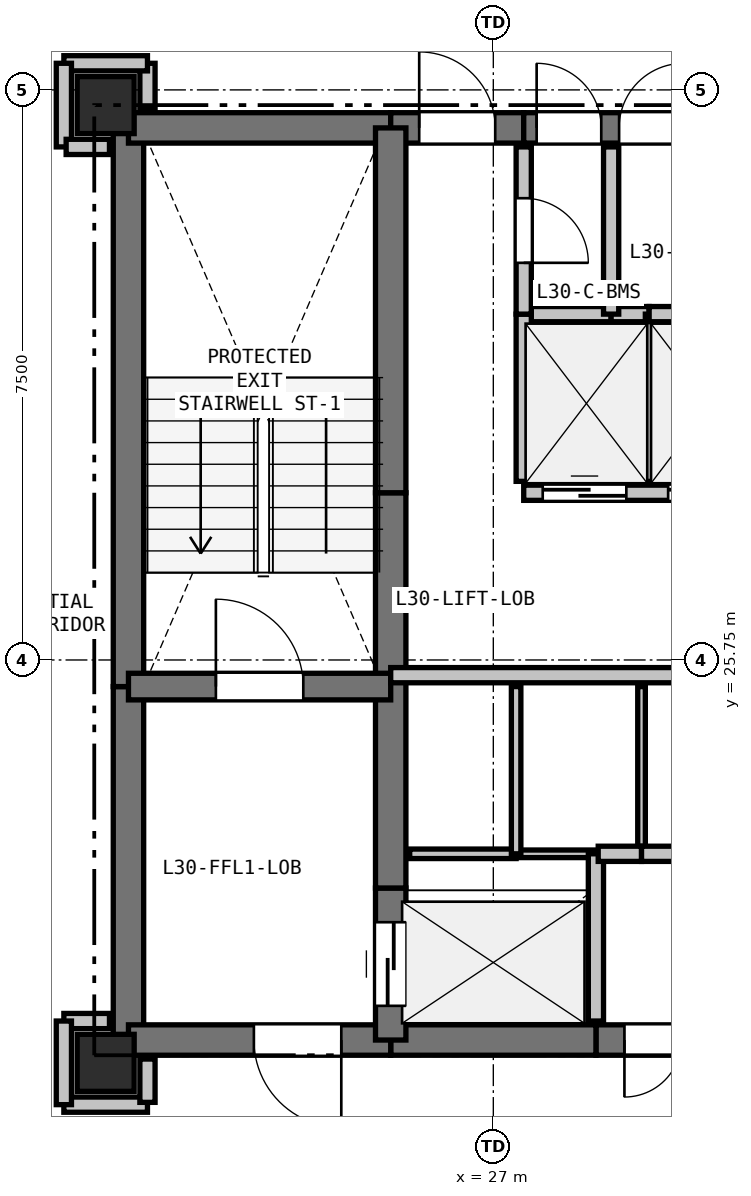
"""IFC4 building model, lengths in metres.
Left out: names, types, materials, properties, quantities, classifications, styles, units other than length and angle.
Written with IfcOpenShell. Run it as: python <this file> out.ifc"""

import sys

from ifc_helpers import new_model, si_unit, direction, frame, frame_2d, origin, origin_2d, place, context, subcontext, project, spatial, rectangle, extrude, element, fill, save


model = new_model("IFC4")
c1 = context("Model", 3, precision=1e-05, world=origin(), true_north=direction((0.0, 1.0)))
c2 = subcontext(c1, "Body", "Model", "MODEL_VIEW")
j1 = project(units=[si_unit("LENGTHUNIT", "METRE"), si_unit("PLANEANGLEUNIT", "RADIAN")], contexts=[c1])
p1 = place(None, origin())
s1 = spatial("IfcSite", under=j1, at=p1, CompositionType="ELEMENT")
p2 = place(p1, origin())
s2 = spatial("IfcBuilding", under=s1, at=p2, CompositionType="ELEMENT")
p3 = place(p2, frame((0.0, 0.0, 109.8)))
s3 = spatial("IfcBuildingStorey", under=s2, at=p3, CompositionType="ELEMENT", Elevation=109.8)
for number, where, z_axis, x_axis in (
    (1, (21.9, 20.45, 0.0), (0.0, 0.0, 1.0), (1.0, 0.0, 0.0)),
    (2, (21.9, 33.05, 0.0), (0.0, 0.0, 1.0), (1.0, 0.0, 0.0)),
):
    element("IfcColumn", number, at=place(p3, frame(where, z_axis=z_axis, x_axis=x_axis)), inside=s3, PredefinedType="COLUMN", context=c2, shape_type="SweptSolid", body=[
        extrude(rectangle(XDim=0.75, YDim=0.75, at=origin_2d()), origin(), (0.0, 0.0, 1.0), 3.3),
    ])
p4 = place(p3, frame((22.2, 20.75, 0.0), z_axis=(0.0, 0.0, 1.0), x_axis=(0.0, 1.0, 0.0)))
e3 = element("IfcWall", 3, at=p4, inside=s3, PredefinedType="SHEAR", context=c2, shape_type="SweptSolid", body=[
    extrude(rectangle(XDim=4.65, YDim=0.4, at=frame_2d((2.325, 0.0))), origin(), (0.0, 0.0, 1.0), 3.05),
])
p5 = place(p3, frame((22.2, 25.4, 0.0), z_axis=(0.0, 0.0, 1.0), x_axis=(0.0, 1.0, 0.0)))
e4 = element("IfcWall", 4, at=p5, inside=s3, PredefinedType="SHEAR", context=c2, shape_type="SweptSolid", body=[
    extrude(rectangle(XDim=7.35, YDim=0.4, at=frame_2d((3.675, 0.0))), origin(), (0.0, 0.0, 1.0), 3.05),
])
p6 = place(p3, frame((22.2, 32.75, 0.0), z_axis=(0.0, 0.0, 1.0), x_axis=(1.0, 0.0, 0.0)))
e5 = element("IfcWall", 5, at=p6, inside=s3, PredefinedType="SHEAR", context=c2, shape_type="SweptSolid", body=[
    extrude(rectangle(XDim=3.45, YDim=0.4, at=frame_2d((1.725, 0.0))), origin(), (0.0, 0.0, 1.0), 3.05),
])
p7 = place(p3, frame((25.65, 32.75, 0.0), z_axis=(0.0, 0.0, 1.0), x_axis=(1.0, 0.0, 0.0)))
e6 = element("IfcWall", 6, at=p7, inside=s3, PredefinedType="SHEAR", context=c2, shape_type="SweptSolid", body=[
    extrude(rectangle(XDim=1.75, YDim=0.4, at=frame_2d((0.875, 0.0))), origin(), (0.0, 0.0, 1.0), 3.05),
])
p8 = place(p7, frame((0.375, 0.0, 0.0)))
e7 = element("IfcOpeningElement", 7, at=p8, cuts=e6, PredefinedType="OPENING", context=c2, shape_type="SweptSolid", body=[
    extrude(rectangle(XDim=1.0, YDim=2.15, at=frame_2d((0.5, 1.075))), frame((0.0, 0.21, 0.0), z_axis=(0.0, -1.0, 0.0), x_axis=(1.0, 0.0, 0.0)), (0.0, 0.0, 1.0), 0.42),
])
p9 = place(p3, frame((27.4, 32.75, 0.0), z_axis=(0.0, 0.0, 1.0), x_axis=(1.0, 0.0, 0.0)))
e8 = element("IfcWall", 8, at=p9, inside=s3, PredefinedType="SHEAR", context=c2, shape_type="SweptSolid", body=[
    extrude(rectangle(XDim=2.25, YDim=0.4, at=frame_2d((1.125, 0.0))), origin(), (0.0, 0.0, 1.0), 3.05),
])
p10 = place(p9, frame((0.17, 0.0, 0.0)))
e9 = element("IfcOpeningElement", 9, at=p10, cuts=e8, PredefinedType="OPENING", context=c2, shape_type="SweptSolid", body=[
    extrude(rectangle(XDim=0.85, YDim=2.1, at=frame_2d((0.425, 1.05))), frame((0.0, 0.21, 0.0), z_axis=(0.0, -1.0, 0.0), x_axis=(1.0, 0.0, 0.0)), (0.0, 0.0, 1.0), 0.42),
])
p11 = place(p9, frame((1.255, 0.0, 0.0)))
e10 = element("IfcOpeningElement", 10, at=p11, cuts=e8, PredefinedType="OPENING", context=c2, shape_type="SweptSolid", body=[
    extrude(rectangle(XDim=0.85, YDim=2.1, at=frame_2d((0.425, 1.05))), frame((0.0, 0.21, 0.0), z_axis=(0.0, -1.0, 0.0), x_axis=(1.0, 0.0, 0.0)), (0.0, 0.0, 1.0), 0.42),
])
p12 = place(p3, frame((30.6, 20.75, 0.0), z_axis=(0.0, 0.0, 1.0), x_axis=(-1.0, 0.0, 0.0)))
e11 = element("IfcWall", 11, at=p12, inside=s3, PredefinedType="SHEAR", context=c2, shape_type="SweptSolid", body=[
    extrude(rectangle(XDim=2.25, YDim=0.4, at=frame_2d((1.125, 0.0))), origin(), (0.0, 0.0, 1.0), 3.05),
])
p13 = place(p12, frame((0.375, 0.0, 0.0)))
e12 = element("IfcOpeningElement", 12, at=p13, cuts=e11, PredefinedType="OPENING", context=c2, shape_type="SweptSolid", body=[
    extrude(rectangle(XDim=1.5, YDim=2.2, at=frame_2d((0.75, 1.1))), frame((0.0, 0.21, 0.0), z_axis=(0.0, -1.0, 0.0), x_axis=(1.0, 0.0, 0.0)), (0.0, 0.0, 1.0), 0.42),
])
p14 = place(p3, frame((28.35, 20.75, 0.0), z_axis=(0.0, 0.0, 1.0), x_axis=(-1.0, 0.0, 0.0)))
e13 = element("IfcWall", 13, at=p14, inside=s3, PredefinedType="SHEAR", context=c2, shape_type="SweptSolid", body=[
    extrude(rectangle(XDim=2.7, YDim=0.4, at=frame_2d((1.35, 0.0))), origin(), (0.0, 0.0, 1.0), 3.05),
])
p15 = place(p3, frame((25.65, 20.75, 0.0), z_axis=(0.0, 0.0, 1.0), x_axis=(-1.0, 0.0, 0.0)))
e14 = element("IfcWall", 14, at=p15, inside=s3, PredefinedType="SHEAR", context=c2, shape_type="SweptSolid", body=[
    extrude(rectangle(XDim=3.45, YDim=0.4, at=frame_2d((1.725, 0.0))), origin(), (0.0, 0.0, 1.0), 3.05),
])
p16 = place(p15, frame((0.65, 0.0, 0.0)))
e15 = element("IfcOpeningElement", 15, at=p16, cuts=e14, PredefinedType="OPENING", context=c2, shape_type="SweptSolid", body=[
    extrude(rectangle(XDim=1.15, YDim=2.15, at=frame_2d((0.575, 1.075))), frame((0.0, 0.21, 0.0), z_axis=(0.0, -1.0, 0.0), x_axis=(1.0, 0.0, 0.0)), (0.0, 0.0, 1.0), 0.42),
])
p17 = place(p3, frame((25.65, 20.75, 0.0), z_axis=(0.0, 0.0, 1.0), x_axis=(0.0, 1.0, 0.0)))
e16 = element("IfcWall", 16, at=p17, inside=s3, PredefinedType="SHEAR", context=c2, shape_type="SweptSolid", body=[
    extrude(rectangle(XDim=2.0, YDim=0.4, at=frame_2d((1.0, 0.0))), origin(), (0.0, 0.0, 1.0), 3.05),
])
p18 = place(p17, frame((0.45, 0.0, 0.0)))
e17 = element("IfcOpeningElement", 17, at=p18, cuts=e16, PredefinedType="OPENING", context=c2, shape_type="SweptSolid", body=[
    extrude(rectangle(XDim=1.1, YDim=2.15, at=frame_2d((0.55, 1.075))), frame((0.0, 0.21, 0.0), z_axis=(0.0, -1.0, 0.0), x_axis=(1.0, 0.0, 0.0)), (0.0, 0.0, 1.0), 0.42),
])
p19 = place(p3, frame((25.65, 22.75, 0.0), z_axis=(0.0, 0.0, 1.0), x_axis=(0.0, 1.0, 0.0)))
e18 = element("IfcWall", 18, at=p19, inside=s3, PredefinedType="SHEAR", context=c2, shape_type="SweptSolid", body=[
    extrude(rectangle(XDim=2.8, YDim=0.4, at=frame_2d((1.4, 0.0))), origin(), (0.0, 0.0, 1.0), 3.05),
])
p20 = place(p3, frame((25.65, 25.55, 0.0), z_axis=(0.0, 0.0, 1.0), x_axis=(0.0, 1.0, 0.0)))
e19 = element("IfcWall", 19, at=p20, inside=s3, PredefinedType="SHEAR", context=c2, shape_type="SweptSolid", body=[
    extrude(rectangle(XDim=2.4, YDim=0.4, at=frame_2d((1.2, 0.0))), origin(), (0.0, 0.0, 1.0), 3.05),
])
p21 = place(p3, frame((25.65, 27.95, 0.0), z_axis=(0.0, 0.0, 1.0), x_axis=(0.0, 1.0, 0.0)))
e20 = element("IfcWall", 20, at=p21, inside=s3, PredefinedType="SHEAR", context=c2, shape_type="SweptSolid", body=[
    extrude(rectangle(XDim=4.8, YDim=0.4, at=frame_2d((2.4, 0.0))), origin(), (0.0, 0.0, 1.0), 3.05),
])
p22 = place(p3, frame((22.2, 25.4, 0.0), z_axis=(0.0, 0.0, 1.0), x_axis=(1.0, 0.0, 0.0)))
e21 = element("IfcWall", 21, at=p22, inside=s3, PredefinedType="SHEAR", context=c2, shape_type="SweptSolid", body=[
    extrude(rectangle(XDim=3.45, YDim=0.35, at=frame_2d((1.725, 0.0))), origin(), (0.0, 0.0, 1.0), 3.05),
])
p23 = place(p22, frame((1.15, 0.0, 0.0)))
e22 = element("IfcOpeningElement", 22, at=p23, cuts=e21, PredefinedType="OPENING", context=c2, shape_type="SweptSolid", body=[
    extrude(rectangle(XDim=1.15, YDim=2.15, at=frame_2d((0.575, 1.075))), frame((0.0, 0.185, 0.0), z_axis=(0.0, -1.0, 0.0), x_axis=(1.0, 0.0, 0.0)), (0.0, 0.0, 1.0), 0.37),
])
p24 = place(p3, frame((25.65, 25.55, 0.0), z_axis=(0.0, 0.0, 1.0), x_axis=(1.0, 0.0, 0.0)))
e23 = element("IfcWall", 23, at=p24, inside=s3, PredefinedType="PARTITIONING", context=c2, shape_type="SweptSolid", body=[
    extrude(rectangle(XDim=4.95, YDim=0.2, at=frame_2d((2.475, 0.0))), origin(), (0.0, 0.0, 1.0), 3.05),
])
p25 = place(p3, frame((27.4, 27.95, 0.0), z_axis=(0.0, 0.0, 1.0), x_axis=(1.0, 0.0, 0.0)))
e24 = element("IfcWall", 24, at=p25, inside=s3, PredefinedType="PARTITIONING", context=c2, shape_type="SweptSolid", body=[
    extrude(rectangle(XDim=4.95, YDim=0.2, at=frame_2d((2.475, 0.0))), origin(), (0.0, 0.0, 1.0), 3.05),
])
p26 = place(p25, frame((0.25, 0.0, 0.0)))
e25 = element("IfcOpeningElement", 25, at=p26, cuts=e24, PredefinedType="OPENING", context=c2, shape_type="SweptSolid", body=[
    extrude(rectangle(XDim=1.1, YDim=2.15, at=frame_2d((0.55, 1.075))), frame((0.0, 0.11, 0.0), z_axis=(0.0, -1.0, 0.0), x_axis=(1.0, 0.0, 0.0)), (0.0, 0.0, 1.0), 0.22),
])
p27 = place(p25, frame((1.9, 0.0, 0.0)))
e26 = element("IfcOpeningElement", 26, at=p27, cuts=e24, PredefinedType="OPENING", context=c2, shape_type="SweptSolid", body=[
    extrude(rectangle(XDim=1.1, YDim=2.15, at=frame_2d((0.55, 1.075))), frame((0.0, 0.11, 0.0), z_axis=(0.0, -1.0, 0.0), x_axis=(1.0, 0.0, 0.0)), (0.0, 0.0, 1.0), 0.22),
])
p28 = place(p25, frame((3.55, 0.0, 0.0)))
e27 = element("IfcOpeningElement", 27, at=p28, cuts=e24, PredefinedType="OPENING", context=c2, shape_type="SweptSolid", body=[
    extrude(rectangle(XDim=1.1, YDim=2.15, at=frame_2d((0.55, 1.075))), frame((0.0, 0.11, 0.0), z_axis=(0.0, -1.0, 0.0), x_axis=(1.0, 0.0, 0.0)), (0.0, 0.0, 1.0), 0.22),
])
p29 = place(p3, frame((25.9, 23.2, 0.0), z_axis=(0.0, 0.0, 1.0), x_axis=(1.0, 0.0, 0.0)))
e28 = element("IfcWall", 28, at=p29, inside=s3, PredefinedType="PARTITIONING", context=c2, shape_type="SweptSolid", body=[
    extrude(rectangle(XDim=1.4, YDim=0.125, at=frame_2d((0.7, 0.0))), origin(), (0.0, 0.0, 1.0), 3.05),
])
p30 = place(p3, frame((27.3, 23.2, 0.0), z_axis=(0.0, 0.0, 1.0), x_axis=(1.0, 0.0, 0.0)))
e29 = element("IfcWall", 29, at=p30, inside=s3, PredefinedType="PARTITIONING", context=c2, shape_type="SweptSolid", body=[
    extrude(rectangle(XDim=1.05, YDim=0.1, at=frame_2d((0.525, 0.0))), origin(), (0.0, 0.0, 1.0), 3.05),
])
p31 = place(p3, frame((28.35, 23.2, 0.0), z_axis=(0.0, 0.0, 1.0), x_axis=(0.0, -1.0, 0.0)))
e30 = element("IfcWall", 30, at=p31, inside=s3, PredefinedType="PARTITIONING", context=c2, shape_type="SweptSolid", body=[
    extrude(rectangle(XDim=2.2, YDim=0.2, at=frame_2d((1.1, 0.0))), origin(), (0.0, 0.0, 1.0), 3.05),
])
p32 = place(p3, frame((27.3, 25.4, 0.0), z_axis=(0.0, 0.0, 1.0), x_axis=(0.0, -1.0, 0.0)))
e31 = element("IfcWall", 31, at=p32, inside=s3, PredefinedType="PARTITIONING", context=c2, shape_type="SweptSolid", body=[
    extrude(rectangle(XDim=2.2, YDim=0.125, at=frame_2d((1.1, 0.0))), origin(), (0.0, 0.0, 1.0), 3.05),
])
p33 = place(p3, frame((28.95, 25.4, 0.0), z_axis=(0.0, 0.0, 1.0), x_axis=(0.0, -1.0, 0.0)))
e32 = element("IfcWall", 32, at=p33, inside=s3, PredefinedType="PARTITIONING", context=c2, shape_type="SweptSolid", body=[
    extrude(rectangle(XDim=2.2, YDim=0.1, at=frame_2d((1.1, 0.0))), origin(), (0.0, 0.0, 1.0), 3.05),
])
p34 = place(p3, frame((28.95, 23.2, 0.0), z_axis=(0.0, 0.0, 1.0), x_axis=(-1.0, 0.0, 0.0)))
e33 = element("IfcWall", 33, at=p34, inside=s3, PredefinedType="PARTITIONING", context=c2, shape_type="SweptSolid", body=[
    extrude(rectangle(XDim=0.57, YDim=0.2, at=frame_2d((0.285, 0.0))), origin(), (0.0, 0.0, 1.0), 3.05),
])
p35 = place(p3, frame((30.6, 23.2, 0.0), z_axis=(0.0, 0.0, 1.0), x_axis=(-1.0, 0.0, 0.0)))
e34 = element("IfcWall", 34, at=p35, inside=s3, PredefinedType="PARTITIONING", context=c2, shape_type="SweptSolid", body=[
    extrude(rectangle(XDim=1.65, YDim=0.2, at=frame_2d((0.825, 0.0))), origin(), (0.0, 0.0, 1.0), 3.05),
])
p36 = place(p3, frame((27.4, 30.3, 0.0), z_axis=(0.0, 0.0, 1.0), x_axis=(1.0, 0.0, 0.0)))
e35 = element("IfcWall", 35, at=p36, inside=s3, PredefinedType="PARTITIONING", context=c2, shape_type="SweptSolid", body=[
    extrude(rectangle(XDim=1.15, YDim=0.2, at=frame_2d((0.575, 0.0))), origin(), (0.0, 0.0, 1.0), 3.05),
])
p37 = place(p3, frame((28.55, 30.3, 0.0), z_axis=(0.0, 0.0, 1.0), x_axis=(1.0, 0.0, 0.0)))
e36 = element("IfcWall", 36, at=p37, inside=s3, PredefinedType="PARTITIONING", context=c2, shape_type="SweptSolid", body=[
    extrude(rectangle(XDim=0.5, YDim=0.2, at=frame_2d((0.25, 0.0))), origin(), (0.0, 0.0, 1.0), 3.05),
])
p38 = place(p3, frame((29.05, 30.3, 0.0), z_axis=(0.0, 0.0, 1.0), x_axis=(0.0, -1.0, 0.0)))
e37 = element("IfcWall", 37, at=p38, inside=s3, PredefinedType="PARTITIONING", context=c2, shape_type="SweptSolid", body=[
    extrude(rectangle(XDim=2.2, YDim=0.1, at=frame_2d((1.1, 0.0))), origin(), (0.0, 0.0, 1.0), 3.05),
])
p39 = place(p3, frame((27.4, 28.1, 0.0), z_axis=(0.0, 0.0, 1.0), x_axis=(0.0, 1.0, 0.0)))
e38 = element("IfcWall", 38, at=p39, inside=s3, PredefinedType="PARTITIONING", context=c2, shape_type="SweptSolid", body=[
    extrude(rectangle(XDim=2.2, YDim=0.2, at=frame_2d((1.1, 0.0))), origin(), (0.0, 0.0, 1.0), 3.05),
])
p40 = place(p3, frame((29.05, 30.3, 0.0), z_axis=(0.0, 0.0, 1.0), x_axis=(1.0, 0.0, 0.0)))
e39 = element("IfcWall", 39, at=p40, inside=s3, PredefinedType="PARTITIONING", context=c2, shape_type="SweptSolid", body=[
    extrude(rectangle(XDim=0.57, YDim=0.2, at=frame_2d((0.285, 0.0))), origin(), (0.0, 0.0, 1.0), 3.05),
])
p41 = place(p3, frame((27.4, 32.5, 0.0), z_axis=(0.0, 0.0, 1.0), x_axis=(0.0, -1.0, 0.0)))
e40 = element("IfcWall", 40, at=p41, inside=s3, PredefinedType="PARTITIONING", context=c2, shape_type="SweptSolid", body=[
    extrude(rectangle(XDim=2.2, YDim=0.2, at=frame_2d((1.1, 0.0))), origin(), (0.0, 0.0, 1.0), 3.05),
])
p42 = place(p41, frame((0.675, 0.0, 0.0)))
e41 = element("IfcOpeningElement", 41, at=p42, cuts=e40, PredefinedType="OPENING", context=c2, shape_type="SweptSolid", body=[
    extrude(rectangle(XDim=0.85, YDim=2.1, at=frame_2d((0.425, 1.05))), frame((0.0, 0.11, 0.0), z_axis=(0.0, -1.0, 0.0), x_axis=(1.0, 0.0, 0.0)), (0.0, 0.0, 1.0), 0.22),
])
p43 = place(p3, frame((21.35, 19.9, 0.0), z_axis=(0.0, 0.0, 1.0), x_axis=(1.0, 0.0, 0.0)))
e42 = element("IfcWall", 42, at=p43, inside=s3, PredefinedType="PARTITIONING", context=c2, shape_type="SweptSolid", body=[
    extrude(rectangle(XDim=1.1, YDim=0.2, at=frame_2d((0.55, 0.0))), origin(), (0.0, 0.0, 1.0), 2.423),
])
p44 = place(p3, frame((22.45, 19.93, 0.0), z_axis=(0.0, 0.0, 1.0), x_axis=(0.0, 1.0, 0.0)))
e43 = element("IfcWall", 43, at=p44, inside=s3, PredefinedType="PARTITIONING", context=c2, shape_type="SweptSolid", body=[
    extrude(rectangle(XDim=0.57, YDim=0.2, at=frame_2d((0.285, 0.0))), origin(), (0.0, 0.0, 1.0), 2.423),
])
p45 = place(p3, frame((22.45, 33.0, 0.0), z_axis=(0.0, 0.0, 1.0), x_axis=(0.0, 1.0, 0.0)))
e44 = element("IfcWall", 44, at=p45, inside=s3, PredefinedType="PARTITIONING", context=c2, shape_type="SweptSolid", body=[
    extrude(rectangle(XDim=0.6, YDim=0.2, at=frame_2d((0.3, 0.0))), origin(), (0.0, 0.0, 1.0), 2.498),
])
p46 = place(p3, frame((22.45, 33.6, 0.0), z_axis=(0.0, 0.0, 1.0), x_axis=(-1.0, 0.0, 0.0)))
e45 = element("IfcWall", 45, at=p46, inside=s3, PredefinedType="PARTITIONING", context=c2, shape_type="SweptSolid", body=[
    extrude(rectangle(XDim=1.1, YDim=0.2, at=frame_2d((0.55, 0.0))), origin(), (0.0, 0.0, 1.0), 3.05),
])
p47 = place(p3, frame((21.35, 33.6, 0.0), z_axis=(0.0, 0.0, 1.0), x_axis=(0.0, -1.0, 0.0)))
e46 = element("IfcWall", 46, at=p47, inside=s3, PredefinedType="PARTITIONING", context=c2, shape_type="SweptSolid", body=[
    extrude(rectangle(XDim=1.1, YDim=0.2, at=frame_2d((0.55, 0.0))), origin(), (0.0, 0.0, 1.0), 2.423),
])
p48 = place(p3, frame((21.38, 32.5, 0.0), z_axis=(0.0, 0.0, 1.0), x_axis=(1.0, 0.0, 0.0)))
e47 = element("IfcWall", 47, at=p48, inside=s3, PredefinedType="PARTITIONING", context=c2, shape_type="SweptSolid", body=[
    extrude(rectangle(XDim=0.57, YDim=0.2, at=frame_2d((0.285, 0.0))), origin(), (0.0, 0.0, 1.0), 2.498),
])
p49 = place(p3, frame((21.95, 21.0, 0.0), z_axis=(0.0, 0.0, 1.0), x_axis=(-1.0, 0.0, 0.0)))
e48 = element("IfcWall", 48, at=p49, inside=s3, PredefinedType="PARTITIONING", context=c2, shape_type="SweptSolid", body=[
    extrude(rectangle(XDim=0.6, YDim=0.2, at=frame_2d((0.3, 0.0))), origin(), (0.0, 0.0, 1.0), 2.498),
])
p50 = place(p3, frame((21.35, 21.0, 0.0), z_axis=(0.0, 0.0, 1.0), x_axis=(0.0, -1.0, 0.0)))
e49 = element("IfcWall", 49, at=p50, inside=s3, PredefinedType="PARTITIONING", context=c2, shape_type="SweptSolid", body=[
    extrude(rectangle(XDim=1.1, YDim=0.2, at=frame_2d((0.55, 0.0))), origin(), (0.0, 0.0, 1.0), 2.423),
])
p51 = place(p3, frame((28.55, 32.5, 0.0), z_axis=(0.0, 0.0, 1.0), x_axis=(0.0, -1.0, 0.0)))
e50 = element("IfcWall", 50, at=p51, inside=s3, PredefinedType="PARTITIONING", context=c2, shape_type="SweptSolid", body=[
    extrude(rectangle(XDim=2.2, YDim=0.2, at=frame_2d((1.1, 0.0))), origin(), (0.0, 0.0, 1.0), 3.05),
])
p52 = place(p26, origin())
e51 = element("IfcDoor", 51, at=p52, inside=s3, OperationType="SLIDING_TO_LEFT", PredefinedType="DOOR", context=c2, shape_type="SweptSolid", body=[
    extrude(rectangle(XDim=1.1, YDim=2.15, at=frame_2d((0.55, 1.075))), frame((0.0, 0.025, 0.0), z_axis=(0.0, -1.0, 0.0), x_axis=(1.0, 0.0, 0.0)), (0.0, 0.0, 1.0), 0.05),
])
fill(e25, e51)
p53 = place(p27, origin())
e52 = element("IfcDoor", 52, at=p53, inside=s3, OperationType="SLIDING_TO_LEFT", PredefinedType="DOOR", context=c2, shape_type="SweptSolid", body=[
    extrude(rectangle(XDim=1.1, YDim=2.15, at=frame_2d((0.55, 1.075))), frame((0.0, 0.025, 0.0), z_axis=(0.0, -1.0, 0.0), x_axis=(1.0, 0.0, 0.0)), (0.0, 0.0, 1.0), 0.05),
])
fill(e26, e52)
p54 = place(p8, origin())
e53 = element("IfcDoor", 53, at=p54, inside=s3, OperationType="SINGLE_SWING_LEFT", PredefinedType="DOOR", context=c2, shape_type="SweptSolid", body=[
    extrude(rectangle(XDim=1.0, YDim=2.15, at=frame_2d((0.5, 1.075))), frame((0.0, 0.025, 0.0), z_axis=(0.0, -1.0, 0.0), x_axis=(1.0, 0.0, 0.0)), (0.0, 0.0, 1.0), 0.05),
])
fill(e7, e53)
p55 = place(p18, origin())
e54 = element("IfcDoor", 54, at=p55, inside=s3, OperationType="SLIDING_TO_LEFT", PredefinedType="DOOR", context=c2, shape_type="SweptSolid", body=[
    extrude(rectangle(XDim=1.1, YDim=2.15, at=frame_2d((0.55, 1.075))), frame((0.0, 0.025, 0.0), z_axis=(0.0, -1.0, 0.0), x_axis=(1.0, 0.0, 0.0)), (0.0, 0.0, 1.0), 0.05),
])
fill(e17, e54)
p56 = place(p23, origin())
e55 = element("IfcDoor", 55, at=p56, inside=s3, OperationType="SINGLE_SWING_LEFT", PredefinedType="DOOR", context=c2, shape_type="SweptSolid", body=[
    extrude(rectangle(XDim=1.15, YDim=2.15, at=frame_2d((0.575, 1.075))), frame((0.0, 0.025, 0.0), z_axis=(0.0, -1.0, 0.0), x_axis=(1.0, 0.0, 0.0)), (0.0, 0.0, 1.0), 0.05),
])
fill(e22, e55)
p57 = place(p16, origin())
e56 = element("IfcDoor", 56, at=p57, inside=s3, OperationType="SINGLE_SWING_LEFT", PredefinedType="DOOR", context=c2, shape_type="SweptSolid", body=[
    extrude(rectangle(XDim=1.15, YDim=2.15, at=frame_2d((0.575, 1.075))), frame((0.0, 0.025, 0.0), z_axis=(0.0, -1.0, 0.0), x_axis=(1.0, 0.0, 0.0)), (0.0, 0.0, 1.0), 0.05),
])
fill(e15, e56)
p58 = place(p13, origin())
e57 = element("IfcDoor", 57, at=p58, inside=s3, OperationType="DOUBLE_DOOR_SINGLE_SWING", PredefinedType="DOOR", context=c2, shape_type="SweptSolid", body=[
    extrude(rectangle(XDim=1.5, YDim=2.2, at=frame_2d((0.75, 1.1))), frame((0.0, 0.025, 0.0), z_axis=(0.0, -1.0, 0.0), x_axis=(1.0, 0.0, 0.0)), (0.0, 0.0, 1.0), 0.05),
])
fill(e12, e57)
p59 = place(p42, origin())
e58 = element("IfcDoor", 58, at=p59, inside=s3, OperationType="SINGLE_SWING_RIGHT", PredefinedType="DOOR", context=c2, shape_type="SweptSolid", body=[
    extrude(rectangle(XDim=0.85, YDim=2.1, at=frame_2d((0.425, 1.05))), frame((0.0, 0.025, 0.0), z_axis=(0.0, -1.0, 0.0), x_axis=(1.0, 0.0, 0.0)), (0.0, 0.0, 1.0), 0.05),
])
fill(e41, e58)
p60 = place(p10, origin())
e59 = element("IfcDoor", 59, at=p60, inside=s3, OperationType="SINGLE_SWING_LEFT", PredefinedType="DOOR", context=c2, shape_type="SweptSolid", body=[
    extrude(rectangle(XDim=0.85, YDim=2.1, at=frame_2d((0.425, 1.05))), frame((0.0, 0.025, 0.0), z_axis=(0.0, -1.0, 0.0), x_axis=(1.0, 0.0, 0.0)), (0.0, 0.0, 1.0), 0.05),
])
fill(e9, e59)
p61 = place(p11, origin())
e60 = element("IfcDoor", 60, at=p61, inside=s3, OperationType="SINGLE_SWING_RIGHT", PredefinedType="DOOR", context=c2, shape_type="SweptSolid", body=[
    extrude(rectangle(XDim=0.85, YDim=2.1, at=frame_2d((0.425, 1.05))), frame((0.0, 0.025, 0.0), z_axis=(0.0, -1.0, 0.0), x_axis=(1.0, 0.0, 0.0)), (0.0, 0.0, 1.0), 0.05),
])
fill(e10, e60)
save(model, sys.argv[1])
